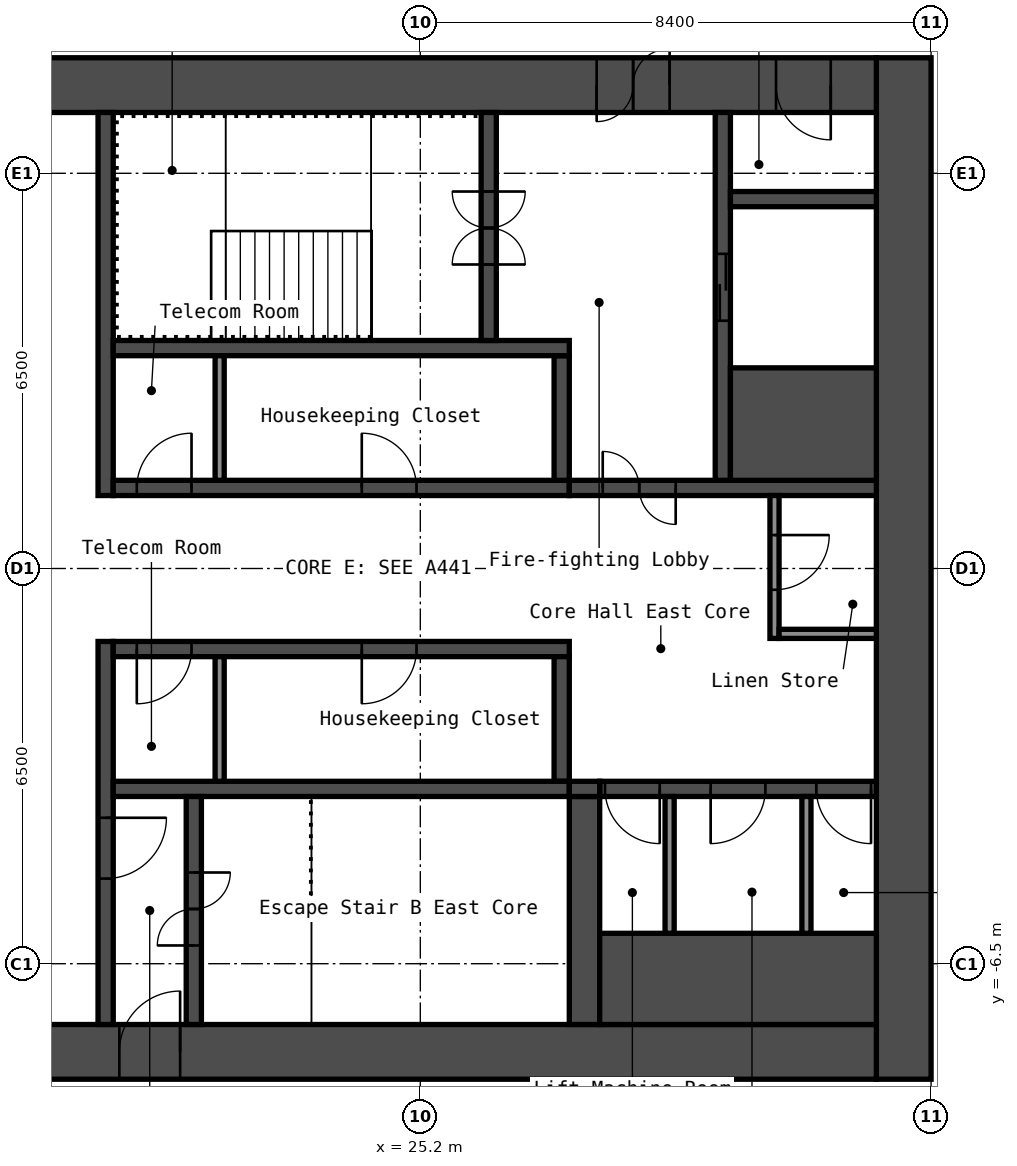
"""IFC4 building model, lengths in metres.
Left out: names, types, materials, properties, quantities, classifications, styles, units other than length and angle.
Written with IfcOpenShell. Run it as: python <this file> out.ifc"""

import sys

from ifc_helpers import new_model, si_unit, direction, frame, frame_2d, origin, place, context, subcontext, project, spatial, rectangle, extrude, element, fill, save


model = new_model("IFC4")
c1 = context("Model", 3, precision=1e-05, world=origin(), true_north=direction((0.0, 1.0)))
c2 = subcontext(c1, "Body", "Model", "MODEL_VIEW")
j1 = project(units=[si_unit("LENGTHUNIT", "METRE"), si_unit("PLANEANGLEUNIT", "RADIAN")], contexts=[c1])
p1 = place(None, origin())
s1 = spatial("IfcSite", under=j1, at=p1, CompositionType="ELEMENT")
p2 = place(p1, origin())
s2 = spatial("IfcBuilding", under=s1, at=p2, CompositionType="ELEMENT")
p3 = place(p2, frame((0.0, 0.0, 280.8)))
s3 = spatial("IfcBuildingStorey", under=s2, at=p3, CompositionType="ELEMENT", Elevation=280.8)
p4 = place(p3, frame((33.15, -8.4, 0.0), z_axis=(0.0, 0.0, 1.0), x_axis=(0.0, 1.0, 0.0)))
e1 = element("IfcWall", 1, at=p4, inside=s3, PredefinedType="SHEAR", context=c2, shape_type="SweptSolid", body=[
    extrude(rectangle(XDim=16.8, YDim=0.9, at=frame_2d((8.4, 0.0))), origin(), (0.0, 0.0, 1.0), 4.0),
])
p5 = place(p3, frame((17.7, 7.95, 0.0), z_axis=(0.0, 0.0, 1.0), x_axis=(1.0, 0.0, 0.0)))
e2 = element("IfcWall", 2, at=p5, inside=s3, PredefinedType="SHEAR", context=c2, shape_type="SweptSolid", body=[
    extrude(rectangle(XDim=15.0, YDim=0.9, at=frame_2d((7.5, 0.0))), origin(), (0.0, 0.0, 1.0), 4.0),
])
p6 = place(p5, frame((10.4, 0.0, 0.0)))
e3 = element("IfcOpeningElement", 3, at=p6, cuts=e2, PredefinedType="OPENING", context=c2, shape_type="SweptSolid", body=[
    extrude(rectangle(XDim=1.2, YDim=2.1, at=frame_2d((0.6, 1.05))), frame((0.0, 0.46, 0.0), z_axis=(0.0, -1.0, 0.0), x_axis=(1.0, 0.0, 0.0)), (0.0, 0.0, 1.0), 0.92),
])
p7 = place(p5, frame((13.35, 0.0, 0.0)))
e4 = element("IfcOpeningElement", 4, at=p7, cuts=e2, PredefinedType="OPENING", context=c2, shape_type="SweptSolid", body=[
    extrude(rectangle(XDim=0.9, YDim=2.1, at=frame_2d((0.45, 1.05))), frame((0.0, 0.46, 0.0), z_axis=(0.0, -1.0, 0.0), x_axis=(1.0, 0.0, 0.0)), (0.0, 0.0, 1.0), 0.92),
])
p8 = place(p3, frame((17.7, -7.95, 0.0), z_axis=(0.0, 0.0, 1.0), x_axis=(1.0, 0.0, 0.0)))
e5 = element("IfcWall", 5, at=p8, inside=s3, PredefinedType="SHEAR", context=c2, shape_type="SweptSolid", body=[
    extrude(rectangle(XDim=15.0, YDim=0.9, at=frame_2d((7.5, 0.0))), origin(), (0.0, 0.0, 1.0), 4.0),
])
p9 = place(p8, frame((2.55, 0.0, 0.0)))
e6 = element("IfcOpeningElement", 6, at=p9, cuts=e5, PredefinedType="OPENING", context=c2, shape_type="SweptSolid", body=[
    extrude(rectangle(XDim=1.0, YDim=2.1, at=frame_2d((0.5, 1.05))), frame((0.0, 0.46, 0.0), z_axis=(0.0, -1.0, 0.0), x_axis=(1.0, 0.0, 0.0)), (0.0, 0.0, 1.0), 0.92),
])
p10 = place(p3, frame((20.025, 1.2, 0.0), z_axis=(0.0, 0.0, 1.0), x_axis=(0.0, 1.0, 0.0)))
e7 = element("IfcWall", 7, at=p10, inside=s3, PredefinedType="SHEAR", context=c2, shape_type="SweptSolid", body=[
    extrude(rectangle(XDim=6.3, YDim=0.25, at=frame_2d((3.15, 0.0))), origin(), (0.0, 0.0, 1.0), 4.0),
])
p11 = place(p3, frame((20.025, -7.5, 0.0), z_axis=(0.0, 0.0, 1.0), x_axis=(0.0, 1.0, 0.0)))
e8 = element("IfcWall", 8, at=p11, inside=s3, PredefinedType="SHEAR", context=c2, shape_type="SweptSolid", body=[
    extrude(rectangle(XDim=6.3, YDim=0.25, at=frame_2d((3.15, 0.0))), origin(), (0.0, 0.0, 1.0), 4.0),
])
p12 = place(p11, frame((2.4, 0.0, 0.0)))
e9 = element("IfcOpeningElement", 9, at=p12, cuts=e8, PredefinedType="OPENING", context=c2, shape_type="SweptSolid", body=[
    extrude(rectangle(XDim=1.0, YDim=2.1, at=frame_2d((0.5, 1.05))), frame((0.0, 0.135, 0.0), z_axis=(0.0, -1.0, 0.0), x_axis=(1.0, 0.0, 0.0)), (0.0, 0.0, 1.0), 0.27),
])
p13 = place(p3, frame((20.15, 1.325, 0.0), z_axis=(0.0, 0.0, 1.0), x_axis=(1.0, 0.0, 0.0)))
e10 = element("IfcWall", 10, at=p13, inside=s3, PredefinedType="SHEAR", context=c2, shape_type="SweptSolid", body=[
    extrude(rectangle(XDim=7.5, YDim=0.25, at=frame_2d((3.75, 0.0))), origin(), (0.0, 0.0, 1.0), 4.0),
])
p14 = place(p13, frame((0.387, 0.0, 0.0)))
e11 = element("IfcOpeningElement", 11, at=p14, cuts=e10, PredefinedType="OPENING", context=c2, shape_type="SweptSolid", body=[
    extrude(rectangle(XDim=0.9, YDim=2.1, at=frame_2d((0.45, 1.05))), frame((0.0, 0.135, 0.0), z_axis=(0.0, -1.0, 0.0), x_axis=(1.0, 0.0, 0.0)), (0.0, 0.0, 1.0), 0.27),
])
p15 = place(p13, frame((4.087, 0.0, 0.0)))
e12 = element("IfcOpeningElement", 12, at=p15, cuts=e10, PredefinedType="OPENING", context=c2, shape_type="SweptSolid", body=[
    extrude(rectangle(XDim=0.9, YDim=2.1, at=frame_2d((0.45, 1.05))), frame((0.0, 0.135, 0.0), z_axis=(0.0, -1.0, 0.0), x_axis=(1.0, 0.0, 0.0)), (0.0, 0.0, 1.0), 0.27),
])
p16 = place(p3, frame((27.525, 1.45, 0.0), z_axis=(0.0, 0.0, 1.0), x_axis=(0.0, 1.0, 0.0)))
e13 = element("IfcWall", 13, at=p16, inside=s3, PredefinedType="SHEAR", context=c2, shape_type="SweptSolid", body=[
    extrude(rectangle(XDim=2.05, YDim=0.25, at=frame_2d((1.025, 0.0))), origin(), (0.0, 0.0, 1.0), 4.0),
])
p17 = place(p3, frame((20.15, 3.625, 0.0), z_axis=(0.0, 0.0, 1.0), x_axis=(1.0, 0.0, 0.0)))
e14 = element("IfcWall", 14, at=p17, inside=s3, PredefinedType="SHEAR", context=c2, shape_type="SweptSolid", body=[
    extrude(rectangle(XDim=7.5, YDim=0.25, at=frame_2d((3.75, 0.0))), origin(), (0.0, 0.0, 1.0), 4.0),
])
p18 = place(p3, frame((26.325, 3.75, 0.0), z_axis=(0.0, 0.0, 1.0), x_axis=(0.0, 1.0, 0.0)))
e15 = element("IfcWall", 15, at=p18, inside=s3, PredefinedType="SHEAR", context=c2, shape_type="SweptSolid", body=[
    extrude(rectangle(XDim=3.75, YDim=0.25, at=frame_2d((1.875, 0.0))), origin(), (0.0, 0.0, 1.0), 4.0),
])
p19 = place(p18, frame((1.25, 0.0, 0.0)))
e16 = element("IfcOpeningElement", 16, at=p19, cuts=e15, PredefinedType="OPENING", context=c2, shape_type="SweptSolid", body=[
    extrude(rectangle(XDim=1.2, YDim=2.1, at=frame_2d((0.6, 1.05))), frame((0.0, 0.135, 0.0), z_axis=(0.0, -1.0, 0.0), x_axis=(1.0, 0.0, 0.0)), (0.0, 0.0, 1.0), 0.27),
])
p20 = place(p3, frame((27.65, 1.325, 0.0), z_axis=(0.0, 0.0, 1.0), x_axis=(1.0, 0.0, 0.0)))
e17 = element("IfcWall", 17, at=p20, inside=s3, PredefinedType="SHEAR", context=c2, shape_type="SweptSolid", body=[
    extrude(rectangle(XDim=5.05, YDim=0.25, at=frame_2d((2.525, 0.0))), origin(), (0.0, 0.0, 1.0), 4.0),
])
p21 = place(p20, frame((0.55, 0.0, 0.0)))
e18 = element("IfcOpeningElement", 18, at=p21, cuts=e17, PredefinedType="OPENING", context=c2, shape_type="SweptSolid", body=[
    extrude(rectangle(XDim=1.2, YDim=2.1, at=frame_2d((0.6, 1.05))), frame((0.0, 0.135, 0.0), z_axis=(0.0, -1.0, 0.0), x_axis=(1.0, 0.0, 0.0)), (0.0, 0.0, 1.0), 0.27),
])
p22 = place(p3, frame((30.175, 1.45, 0.0), z_axis=(0.0, 0.0, 1.0), x_axis=(0.0, 1.0, 0.0)))
e19 = element("IfcWall", 19, at=p22, inside=s3, PredefinedType="SHEAR", context=c2, shape_type="SweptSolid", body=[
    extrude(rectangle(XDim=6.05, YDim=0.25, at=frame_2d((3.025, 0.0))), origin(), (0.0, 0.0, 1.0), 4.0),
])
p23 = place(p22, frame((2.625, 0.0, 0.0)))
e20 = element("IfcOpeningElement", 20, at=p23, cuts=e19, PredefinedType="OPENING", context=c2, shape_type="SweptSolid", body=[
    extrude(rectangle(XDim=1.1, YDim=2.1, at=frame_2d((0.55, 1.05))), frame((0.0, 0.135, 0.0), z_axis=(0.0, -1.0, 0.0), x_axis=(1.0, 0.0, 0.0)), (0.0, 0.0, 1.0), 0.27),
])
p24 = place(p3, frame((30.3, 2.375, 0.0), z_axis=(0.0, 0.0, 1.0), x_axis=(1.0, 0.0, 0.0)))
e21 = element("IfcWall", 21, at=p24, inside=s3, PredefinedType="SHEAR", context=c2, shape_type="SweptSolid", body=[
    extrude(rectangle(XDim=2.4, YDim=1.85, at=frame_2d((1.2, 0.0))), origin(), (0.0, 0.0, 1.0), 4.0),
])
p25 = place(p3, frame((30.3, 6.075, 0.0), z_axis=(0.0, 0.0, 1.0), x_axis=(1.0, 0.0, 0.0)))
e22 = element("IfcWall", 22, at=p25, inside=s3, PredefinedType="SHEAR", context=c2, shape_type="SweptSolid", body=[
    extrude(rectangle(XDim=2.4, YDim=0.25, at=frame_2d((1.2, 0.0))), origin(), (0.0, 0.0, 1.0), 4.0),
])
p26 = place(p3, frame((20.15, -1.325, 0.0), z_axis=(0.0, 0.0, 1.0), x_axis=(1.0, 0.0, 0.0)))
e23 = element("IfcWall", 23, at=p26, inside=s3, PredefinedType="SHEAR", context=c2, shape_type="SweptSolid", body=[
    extrude(rectangle(XDim=7.5, YDim=0.25, at=frame_2d((3.75, 0.0))), origin(), (0.0, 0.0, 1.0), 4.0),
])
p27 = place(p26, frame((0.387, 0.0, 0.0)))
e24 = element("IfcOpeningElement", 24, at=p27, cuts=e23, PredefinedType="OPENING", context=c2, shape_type="SweptSolid", body=[
    extrude(rectangle(XDim=0.9, YDim=2.1, at=frame_2d((0.45, 1.05))), frame((0.0, 0.135, 0.0), z_axis=(0.0, -1.0, 0.0), x_axis=(1.0, 0.0, 0.0)), (0.0, 0.0, 1.0), 0.27),
])
p28 = place(p26, frame((4.087, 0.0, 0.0)))
e25 = element("IfcOpeningElement", 25, at=p28, cuts=e23, PredefinedType="OPENING", context=c2, shape_type="SweptSolid", body=[
    extrude(rectangle(XDim=0.9, YDim=2.1, at=frame_2d((0.45, 1.05))), frame((0.0, 0.135, 0.0), z_axis=(0.0, -1.0, 0.0), x_axis=(1.0, 0.0, 0.0)), (0.0, 0.0, 1.0), 0.27),
])
p29 = place(p3, frame((27.525, -3.5, 0.0), z_axis=(0.0, 0.0, 1.0), x_axis=(0.0, 1.0, 0.0)))
e26 = element("IfcWall", 26, at=p29, inside=s3, PredefinedType="SHEAR", context=c2, shape_type="SweptSolid", body=[
    extrude(rectangle(XDim=2.05, YDim=0.25, at=frame_2d((1.025, 0.0))), origin(), (0.0, 0.0, 1.0), 4.0),
])
p30 = place(p3, frame((20.15, -3.625, 0.0), z_axis=(0.0, 0.0, 1.0), x_axis=(1.0, 0.0, 0.0)))
e27 = element("IfcWall", 27, at=p30, inside=s3, PredefinedType="SHEAR", context=c2, shape_type="SweptSolid", body=[
    extrude(rectangle(XDim=7.5, YDim=0.25, at=frame_2d((3.75, 0.0))), origin(), (0.0, 0.0, 1.0), 4.0),
])
p31 = place(p3, frame((21.475, -7.5, 0.0), z_axis=(0.0, 0.0, 1.0), x_axis=(0.0, 1.0, 0.0)))
e28 = element("IfcWall", 28, at=p31, inside=s3, PredefinedType="SHEAR", context=c2, shape_type="SweptSolid", body=[
    extrude(rectangle(XDim=3.75, YDim=0.25, at=frame_2d((1.875, 0.0))), origin(), (0.0, 0.0, 1.0), 4.0),
])
p32 = place(p31, frame((1.3, 0.0, 0.0)))
e29 = element("IfcOpeningElement", 29, at=p32, cuts=e28, PredefinedType="OPENING", context=c2, shape_type="SweptSolid", body=[
    extrude(rectangle(XDim=1.2, YDim=2.1, at=frame_2d((0.6, 1.05))), frame((0.0, 0.135, 0.0), z_axis=(0.0, -1.0, 0.0), x_axis=(1.0, 0.0, 0.0)), (0.0, 0.0, 1.0), 0.27),
])
p33 = place(p3, frame((27.9, -7.5, 0.0), z_axis=(0.0, 0.0, 1.0), x_axis=(0.0, 1.0, 0.0)))
e30 = element("IfcWall", 30, at=p33, inside=s3, PredefinedType="SHEAR", context=c2, shape_type="SweptSolid", body=[
    extrude(rectangle(XDim=3.75, YDim=0.5, at=frame_2d((1.875, 0.0))), origin(), (0.0, 0.0, 1.0), 4.0),
])
p34 = place(p3, frame((28.15, -3.625, 0.0), z_axis=(0.0, 0.0, 1.0), x_axis=(1.0, 0.0, 0.0)))
e31 = element("IfcWall", 31, at=p34, inside=s3, PredefinedType="SHEAR", context=c2, shape_type="SweptSolid", body=[
    extrude(rectangle(XDim=4.55, YDim=0.25, at=frame_2d((2.275, 0.0))), origin(), (0.0, 0.0, 1.0), 4.0),
])
p35 = place(p34, frame((0.087, 0.0, 0.0)))
e32 = element("IfcOpeningElement", 32, at=p35, cuts=e31, PredefinedType="OPENING", context=c2, shape_type="SweptSolid", body=[
    extrude(rectangle(XDim=0.9, YDim=2.1, at=frame_2d((0.45, 1.05))), frame((0.0, 0.135, 0.0), z_axis=(0.0, -1.0, 0.0), x_axis=(1.0, 0.0, 0.0)), (0.0, 0.0, 1.0), 0.27),
])
p36 = place(p34, frame((1.825, 0.0, 0.0)))
e33 = element("IfcOpeningElement", 33, at=p36, cuts=e31, PredefinedType="OPENING", context=c2, shape_type="SweptSolid", body=[
    extrude(rectangle(XDim=0.9, YDim=2.1, at=frame_2d((0.45, 1.05))), frame((0.0, 0.135, 0.0), z_axis=(0.0, -1.0, 0.0), x_axis=(1.0, 0.0, 0.0)), (0.0, 0.0, 1.0), 0.27),
])
p37 = place(p34, frame((3.562, 0.0, 0.0)))
e34 = element("IfcOpeningElement", 34, at=p37, cuts=e31, PredefinedType="OPENING", context=c2, shape_type="SweptSolid", body=[
    extrude(rectangle(XDim=0.9, YDim=2.1, at=frame_2d((0.45, 1.05))), frame((0.0, 0.135, 0.0), z_axis=(0.0, -1.0, 0.0), x_axis=(1.0, 0.0, 0.0)), (0.0, 0.0, 1.0), 0.27),
])
p38 = place(p3, frame((28.15, -6.75, 0.0), z_axis=(0.0, 0.0, 1.0), x_axis=(1.0, 0.0, 0.0)))
e35 = element("IfcWall", 35, at=p38, inside=s3, PredefinedType="SHEAR", context=c2, shape_type="SweptSolid", body=[
    extrude(rectangle(XDim=4.55, YDim=1.5, at=frame_2d((2.275, 0.0))), origin(), (0.0, 0.0, 1.0), 4.0),
])
p39 = place(p3, frame((27.65, -3.625, 0.0), z_axis=(0.0, 0.0, 1.0), x_axis=(1.0, 0.0, 0.0)))
e36 = element("IfcWall", 36, at=p39, inside=s3, PredefinedType="SHEAR", context=c2, shape_type="SweptSolid", body=[
    extrude(rectangle(XDim=0.5, YDim=0.25, at=frame_2d((0.25, 0.0))), origin(), (0.0, 0.0, 1.0), 4.0),
])
p40 = place(p3, frame((31.025, -1.15, 0.0), z_axis=(0.0, 0.0, 1.0), x_axis=(0.0, 1.0, 0.0)))
e37 = element("IfcWall", 37, at=p40, inside=s3, PredefinedType="PARTITIONING", context=c2, shape_type="SweptSolid", body=[
    extrude(rectangle(XDim=2.35, YDim=0.15, at=frame_2d((1.175, 0.0))), origin(), (0.0, 0.0, 1.0), 4.0),
])
p41 = place(p40, frame((0.8, 0.0, 0.0)))
e38 = element("IfcOpeningElement", 38, at=p41, cuts=e37, PredefinedType="OPENING", context=c2, shape_type="SweptSolid", body=[
    extrude(rectangle(XDim=0.9, YDim=2.1, at=frame_2d((0.45, 1.05))), frame((0.0, 0.085, 0.0), z_axis=(0.0, -1.0, 0.0), x_axis=(1.0, 0.0, 0.0)), (0.0, 0.0, 1.0), 0.17),
])
p42 = place(p3, frame((31.1, -1.075, 0.0), z_axis=(0.0, 0.0, 1.0), x_axis=(1.0, 0.0, 0.0)))
e39 = element("IfcWall", 39, at=p42, inside=s3, PredefinedType="PARTITIONING", context=c2, shape_type="SweptSolid", body=[
    extrude(rectangle(XDim=1.6, YDim=0.15, at=frame_2d((0.8, 0.0))), origin(), (0.0, 0.0, 1.0), 4.0),
])
for number, where, z_axis, x_axis in (
    (40, (21.9, 1.45, 0.0), (0.0, 0.0, 1.0), (0.0, 1.0, 0.0)),
    (41, (21.9, -3.5, 0.0), (0.0, 0.0, 1.0), (0.0, 1.0, 0.0)),
):
    element("IfcWall", number, at=place(p3, frame(where, z_axis=z_axis, x_axis=x_axis)), inside=s3, PredefinedType="PARTITIONING", context=c2, shape_type="SweptSolid", body=[
        extrude(rectangle(XDim=2.05, YDim=0.15, at=frame_2d((1.025, 0.0))), origin(), (0.0, 0.0, 1.0), 4.0),
    ])
for number, where, z_axis, x_axis in (
    (42, (29.3, -6.0, 0.0), (0.0, 0.0, 1.0), (0.0, 1.0, 0.0)),
    (43, (31.55, -6.0, 0.0), (0.0, 0.0, 1.0), (0.0, 1.0, 0.0)),
):
    element("IfcWall", number, at=place(p3, frame(where, z_axis=z_axis, x_axis=x_axis)), inside=s3, PredefinedType="PARTITIONING", context=c2, shape_type="SweptSolid", body=[
        extrude(rectangle(XDim=2.25, YDim=0.15, at=frame_2d((1.125, 0.0))), origin(), (0.0, 0.0, 1.0), 4.0),
    ])
p43 = place(p6, origin())
e44 = element("IfcDoor", 44, at=p43, inside=s3, OperationType="DOUBLE_DOOR_SINGLE_SWING", PredefinedType="DOOR", context=c2, shape_type="SweptSolid", body=[
    extrude(rectangle(XDim=1.2, YDim=2.1, at=frame_2d((0.6, 1.05))), frame((0.0, 0.025, 0.0), z_axis=(0.0, -1.0, 0.0), x_axis=(1.0, 0.0, 0.0)), (0.0, 0.0, 1.0), 0.05),
])
fill(e3, e44)
p44 = place(p7, origin())
e45 = element("IfcDoor", 45, at=p44, inside=s3, OperationType="SINGLE_SWING_RIGHT", PredefinedType="DOOR", context=c2, shape_type="SweptSolid", body=[
    extrude(rectangle(XDim=0.9, YDim=2.1, at=frame_2d((0.45, 1.05))), frame((0.0, 0.025, 0.0), z_axis=(0.0, -1.0, 0.0), x_axis=(1.0, 0.0, 0.0)), (0.0, 0.0, 1.0), 0.05),
])
fill(e4, e45)
p45 = place(p9, origin())
e46 = element("IfcDoor", 46, at=p45, inside=s3, OperationType="SINGLE_SWING_LEFT", PredefinedType="DOOR", context=c2, shape_type="SweptSolid", body=[
    extrude(rectangle(XDim=1.0, YDim=2.1, at=frame_2d((0.5, 1.05))), frame((0.0, 0.025, 0.0), z_axis=(0.0, -1.0, 0.0), x_axis=(1.0, 0.0, 0.0)), (0.0, 0.0, 1.0), 0.05),
])
fill(e6, e46)
p46 = place(p19, origin())
e47 = element("IfcDoor", 47, at=p46, inside=s3, OperationType="DOUBLE_DOOR_SINGLE_SWING", PredefinedType="DOOR", context=c2, shape_type="SweptSolid", body=[
    extrude(rectangle(XDim=1.2, YDim=2.1, at=frame_2d((0.6, 1.05))), frame((0.0, 0.025, 0.0), z_axis=(0.0, -1.0, 0.0), x_axis=(1.0, 0.0, 0.0)), (0.0, 0.0, 1.0), 0.05),
])
fill(e16, e47)
p47 = place(p32, origin())
e48 = element("IfcDoor", 48, at=p47, inside=s3, OperationType="DOUBLE_DOOR_SINGLE_SWING", PredefinedType="DOOR", context=c2, shape_type="SweptSolid", body=[
    extrude(rectangle(XDim=1.2, YDim=2.1, at=frame_2d((0.6, 1.05))), frame((0.0, 0.025, 0.0), z_axis=(0.0, -1.0, 0.0), x_axis=(1.0, 0.0, 0.0)), (0.0, 0.0, 1.0), 0.05),
])
fill(e29, e48)
p48 = place(p12, origin())
e49 = element("IfcDoor", 49, at=p48, inside=s3, OperationType="SINGLE_SWING_RIGHT", PredefinedType="DOOR", context=c2, shape_type="SweptSolid", body=[
    extrude(rectangle(XDim=1.0, YDim=2.1, at=frame_2d((0.5, 1.05))), frame((0.0, 0.025, 0.0), z_axis=(0.0, -1.0, 0.0), x_axis=(1.0, 0.0, 0.0)), (0.0, 0.0, 1.0), 0.05),
])
fill(e9, e49)
p49 = place(p21, origin())
e50 = element("IfcDoor", 50, at=p49, inside=s3, OperationType="DOUBLE_DOOR_SINGLE_SWING", PredefinedType="DOOR", context=c2, shape_type="SweptSolid", body=[
    extrude(rectangle(XDim=1.2, YDim=2.1, at=frame_2d((0.6, 1.05))), frame((0.0, 0.025, 0.0), z_axis=(0.0, -1.0, 0.0), x_axis=(1.0, 0.0, 0.0)), (0.0, 0.0, 1.0), 0.05),
])
fill(e18, e50)
p50 = place(p41, origin())
e51 = element("IfcDoor", 51, at=p50, inside=s3, OperationType="SINGLE_SWING_RIGHT", PredefinedType="DOOR", context=c2, shape_type="SweptSolid", body=[
    extrude(rectangle(XDim=0.9, YDim=2.1, at=frame_2d((0.45, 1.05))), frame((0.0, 0.025, 0.0), z_axis=(0.0, -1.0, 0.0), x_axis=(1.0, 0.0, 0.0)), (0.0, 0.0, 1.0), 0.05),
])
fill(e38, e51)
p51 = place(p14, origin())
e52 = element("IfcDoor", 52, at=p51, inside=s3, OperationType="SINGLE_SWING_LEFT", PredefinedType="DOOR", context=c2, shape_type="SweptSolid", body=[
    extrude(rectangle(XDim=0.9, YDim=2.1, at=frame_2d((0.45, 1.05))), frame((0.0, 0.025, 0.0), z_axis=(0.0, -1.0, 0.0), x_axis=(1.0, 0.0, 0.0)), (0.0, 0.0, 1.0), 0.05),
])
fill(e11, e52)
p52 = place(p15, origin())
e53 = element("IfcDoor", 53, at=p52, inside=s3, OperationType="SINGLE_SWING_RIGHT", PredefinedType="DOOR", context=c2, shape_type="SweptSolid", body=[
    extrude(rectangle(XDim=0.9, YDim=2.1, at=frame_2d((0.45, 1.05))), frame((0.0, 0.025, 0.0), z_axis=(0.0, -1.0, 0.0), x_axis=(1.0, 0.0, 0.0)), (0.0, 0.0, 1.0), 0.05),
])
fill(e12, e53)
p53 = place(p27, origin())
e54 = element("IfcDoor", 54, at=p53, inside=s3, OperationType="SINGLE_SWING_LEFT", PredefinedType="DOOR", context=c2, shape_type="SweptSolid", body=[
    extrude(rectangle(XDim=0.9, YDim=2.1, at=frame_2d((0.45, 1.05))), frame((0.0, 0.025, 0.0), z_axis=(0.0, -1.0, 0.0), x_axis=(1.0, 0.0, 0.0)), (0.0, 0.0, 1.0), 0.05),
])
fill(e24, e54)
p54 = place(p28, origin())
e55 = element("IfcDoor", 55, at=p54, inside=s3, OperationType="SINGLE_SWING_LEFT", PredefinedType="DOOR", context=c2, shape_type="SweptSolid", body=[
    extrude(rectangle(XDim=0.9, YDim=2.1, at=frame_2d((0.45, 1.05))), frame((0.0, 0.025, 0.0), z_axis=(0.0, -1.0, 0.0), x_axis=(1.0, 0.0, 0.0)), (0.0, 0.0, 1.0), 0.05),
])
fill(e25, e55)
p55 = place(p35, origin())
e56 = element("IfcDoor", 56, at=p55, inside=s3, OperationType="SINGLE_SWING_RIGHT", PredefinedType="DOOR", context=c2, shape_type="SweptSolid", body=[
    extrude(rectangle(XDim=0.9, YDim=2.1, at=frame_2d((0.45, 1.05))), frame((0.0, 0.025, 0.0), z_axis=(0.0, -1.0, 0.0), x_axis=(1.0, 0.0, 0.0)), (0.0, 0.0, 1.0), 0.05),
])
fill(e32, e56)
p56 = place(p36, origin())
e57 = element("IfcDoor", 57, at=p56, inside=s3, OperationType="SINGLE_SWING_LEFT", PredefinedType="DOOR", context=c2, shape_type="SweptSolid", body=[
    extrude(rectangle(XDim=0.9, YDim=2.1, at=frame_2d((0.45, 1.05))), frame((0.0, 0.025, 0.0), z_axis=(0.0, -1.0, 0.0), x_axis=(1.0, 0.0, 0.0)), (0.0, 0.0, 1.0), 0.05),
])
fill(e33, e57)
p57 = place(p37, origin())
e58 = element("IfcDoor", 58, at=p57, inside=s3, OperationType="SINGLE_SWING_RIGHT", PredefinedType="DOOR", context=c2, shape_type="SweptSolid", body=[
    extrude(rectangle(XDim=0.9, YDim=2.1, at=frame_2d((0.45, 1.05))), frame((0.0, 0.025, 0.0), z_axis=(0.0, -1.0, 0.0), x_axis=(1.0, 0.0, 0.0)), (0.0, 0.0, 1.0), 0.05),
])
fill(e34, e58)
p58 = place(p23, origin())
e59 = element("IfcDoor", 59, at=p58, inside=s3, OperationType="DOUBLE_DOOR_SLIDING", PredefinedType="DOOR", context=c2, shape_type="SweptSolid", body=[
    extrude(rectangle(XDim=1.1, YDim=2.1, at=frame_2d((0.55, 1.05))), frame((0.0, 0.025, 0.0), z_axis=(0.0, -1.0, 0.0), x_axis=(1.0, 0.0, 0.0)), (0.0, 0.0, 1.0), 0.05),
])
fill(e20, e59)
p59 = place(p2, frame((0.0, 0.0, 285.0)))
p60 = place(p59, frame((26.325, 3.75, 0.0), z_axis=(0.0, 0.0, 1.0), x_axis=(0.0, 1.0, 0.0)))
p61 = place(p60, frame((1.25, 0.0, 0.0)))
p62 = place(p61, frame((1.2, 0.0, 0.0), z_axis=(0.0, 0.0, 1.0), x_axis=(-1.0, 0.0, 0.0)))
e60 = element("IfcDoor", 60, at=p62, inside=s3, OperationType="DOUBLE_DOOR_SINGLE_SWING", PredefinedType="DOOR", context=c2, shape_type="SweptSolid", body=[
    extrude(rectangle(XDim=1.2, YDim=2.1, at=frame_2d((0.6, 1.05))), frame((0.0, 0.025, 0.0), z_axis=(0.0, -1.0, 0.0), x_axis=(1.0, 0.0, 0.0)), (0.0, 0.0, 1.0), 0.05),
])
save(model, sys.argv[1])
